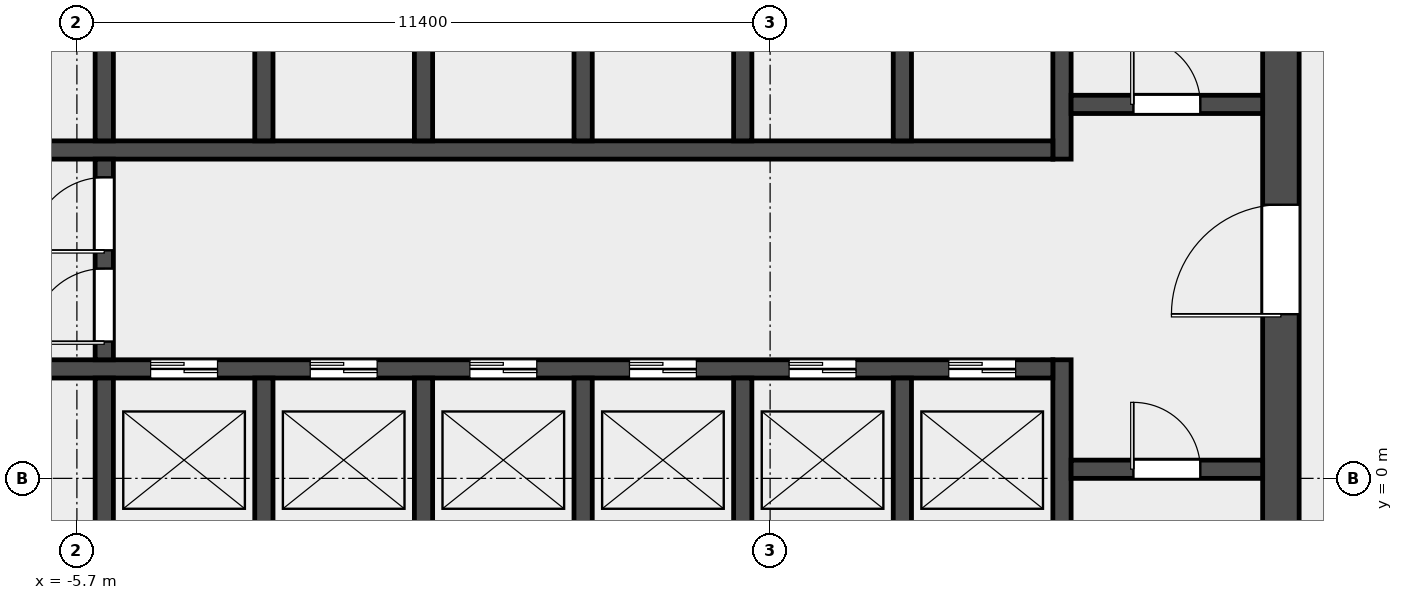
"""IFC4 building model, lengths in metres.
Left out: names, types, materials, properties, quantities, classifications, styles, units other than length and angle.
Written with IfcOpenShell. Run it as: python <this file> out.ifc"""

import sys

from ifc_helpers import new_model, si_unit, direction, frame, frame_2d, origin, place, context, subcontext, project, spatial, rectangle, extrude, element, fill, save


model = new_model("IFC4")
c1 = context("Model", 3, precision=1e-05, world=origin(), true_north=direction((0.0, 1.0)))
c2 = subcontext(c1, "Body", "Model", "MODEL_VIEW")
j1 = project(units=[si_unit("LENGTHUNIT", "METRE"), si_unit("PLANEANGLEUNIT", "RADIAN")], contexts=[c1])
p1 = place(None, origin())
s1 = spatial("IfcSite", under=j1, at=p1, CompositionType="ELEMENT")
p2 = place(p1, origin())
s2 = spatial("IfcBuilding", under=s1, at=p2, CompositionType="ELEMENT")
p3 = place(p2, frame((0.0, 0.0, 40.6)))
s3 = spatial("IfcBuildingStorey", under=s2, at=p3, CompositionType="ELEMENT", Elevation=40.6)
p4 = place(p3, frame((14.1, -6.6, 0.0), z_axis=(0.0, 0.0, 1.0), x_axis=(0.0, 1.0, 0.0)))
e1 = element("IfcWall", 1, at=p4, inside=s3, PredefinedType="SHEAR", context=c2, shape_type="SweptSolid", body=[
    extrude(rectangle(XDim=19.5, YDim=0.6, at=frame_2d((9.75, 0.0))), origin(), (0.0, 0.0, 1.0), 4.5),
])
p5 = place(p4, frame((9.3, 0.0, 0.0)))
e2 = element("IfcOpeningElement", 2, at=p5, cuts=e1, PredefinedType="OPENING", context=c2, shape_type="SweptSolid", body=[
    extrude(rectangle(XDim=1.8, YDim=2.1, at=frame_2d((0.9, 1.05))), frame((0.0, 0.312, 0.0), z_axis=(0.0, -1.0, 0.0), x_axis=(1.0, 0.0, 0.0)), (0.0, 0.0, 1.0), 0.624),
])
p6 = place(p3, frame((10.5, -6.6, 0.0), z_axis=(0.0, 0.0, 1.0), x_axis=(0.0, 1.0, 0.0)))
e3 = element("IfcWall", 3, at=p6, inside=s3, PredefinedType="SHEAR", context=c2, shape_type="SweptSolid", body=[
    extrude(rectangle(XDim=8.55, YDim=0.3, at=frame_2d((4.275, 0.0))), origin(), (0.0, 0.0, 1.0), 4.5),
])
p7 = place(p3, frame((10.5, 5.25, 0.0), z_axis=(0.0, 0.0, 1.0), x_axis=(0.0, 1.0, 0.0)))
e4 = element("IfcWall", 4, at=p7, inside=s3, PredefinedType="SHEAR", context=c2, shape_type="SweptSolid", body=[
    extrude(rectangle(XDim=7.65, YDim=0.3, at=frame_2d((3.825, 0.0))), origin(), (0.0, 0.0, 1.0), 4.5),
])
p8 = place(p3, frame((10.65, 0.15, 0.0), z_axis=(0.0, 0.0, 1.0), x_axis=(1.0, 0.0, 0.0)))
e5 = element("IfcWall", 5, at=p8, inside=s3, PredefinedType="SOLIDWALL", context=c2, shape_type="SweptSolid", body=[
    extrude(rectangle(XDim=3.15, YDim=0.3, at=frame_2d((1.575, 0.0))), origin(), (0.0, 0.0, 1.0), 4.5),
])
p9 = place(p8, frame((1.025, 0.0, 0.0)))
e6 = element("IfcOpeningElement", 6, at=p9, cuts=e5, PredefinedType="OPENING", context=c2, shape_type="SweptSolid", body=[
    extrude(rectangle(XDim=1.1, YDim=2.1, at=frame_2d((0.55, 1.05))), frame((0.0, 0.162, 0.0), z_axis=(0.0, -1.0, 0.0), x_axis=(1.0, 0.0, 0.0)), (0.0, 0.0, 1.0), 0.324),
])
p10 = place(p3, frame((10.65, 6.15, 0.0), z_axis=(0.0, 0.0, 1.0), x_axis=(1.0, 0.0, 0.0)))
e7 = element("IfcWall", 7, at=p10, inside=s3, PredefinedType="SOLIDWALL", context=c2, shape_type="SweptSolid", body=[
    extrude(rectangle(XDim=3.15, YDim=0.3, at=frame_2d((1.575, 0.0))), origin(), (0.0, 0.0, 1.0), 4.5),
])
p11 = place(p10, frame((1.025, 0.0, 0.0)))
e8 = element("IfcOpeningElement", 8, at=p11, cuts=e7, PredefinedType="OPENING", context=c2, shape_type="SweptSolid", body=[
    extrude(rectangle(XDim=1.1, YDim=2.1, at=frame_2d((0.55, 1.05))), frame((0.0, 0.162, 0.0), z_axis=(0.0, -1.0, 0.0), x_axis=(1.0, 0.0, 0.0)), (0.0, 0.0, 1.0), 0.324),
])
p12 = place(p3, frame((-10.35, 1.8, 0.0), z_axis=(0.0, 0.0, 1.0), x_axis=(1.0, 0.0, 0.0)))
e9 = element("IfcWall", 9, at=p12, inside=s3, PredefinedType="SOLIDWALL", context=c2, shape_type="SweptSolid", body=[
    extrude(rectangle(XDim=20.7, YDim=0.3, at=frame_2d((10.35, 0.0))), origin(), (0.0, 0.0, 1.0), 4.5),
])
p13 = place(p12, frame((0.512, 0.0, 0.0)))
e10 = element("IfcOpeningElement", 10, at=p13, cuts=e9, PredefinedType="OPENING", context=c2, shape_type="SweptSolid", body=[
    extrude(rectangle(XDim=1.3, YDim=2.1, at=frame_2d((0.65, 1.05))), frame((0.0, 0.162, 0.0), z_axis=(0.0, -1.0, 0.0), x_axis=(1.0, 0.0, 0.0)), (0.0, 0.0, 1.0), 0.324),
])
p14 = place(p12, frame((5.863, 0.0, 0.0)))
e11 = element("IfcOpeningElement", 11, at=p14, cuts=e9, PredefinedType="OPENING", context=c2, shape_type="SweptSolid", body=[
    extrude(rectangle(XDim=1.1, YDim=2.1, at=frame_2d((0.55, 1.05))), frame((0.0, 0.162, 0.0), z_axis=(0.0, -1.0, 0.0), x_axis=(1.0, 0.0, 0.0)), (0.0, 0.0, 1.0), 0.324),
])
p15 = place(p12, frame((8.488, 0.0, 0.0)))
e12 = element("IfcOpeningElement", 12, at=p15, cuts=e9, PredefinedType="OPENING", context=c2, shape_type="SweptSolid", body=[
    extrude(rectangle(XDim=1.1, YDim=2.1, at=frame_2d((0.55, 1.05))), frame((0.0, 0.162, 0.0), z_axis=(0.0, -1.0, 0.0), x_axis=(1.0, 0.0, 0.0)), (0.0, 0.0, 1.0), 0.324),
])
p16 = place(p12, frame((11.113, 0.0, 0.0)))
e13 = element("IfcOpeningElement", 13, at=p16, cuts=e9, PredefinedType="OPENING", context=c2, shape_type="SweptSolid", body=[
    extrude(rectangle(XDim=1.1, YDim=2.1, at=frame_2d((0.55, 1.05))), frame((0.0, 0.162, 0.0), z_axis=(0.0, -1.0, 0.0), x_axis=(1.0, 0.0, 0.0)), (0.0, 0.0, 1.0), 0.324),
])
p17 = place(p12, frame((13.738, 0.0, 0.0)))
e14 = element("IfcOpeningElement", 14, at=p17, cuts=e9, PredefinedType="OPENING", context=c2, shape_type="SweptSolid", body=[
    extrude(rectangle(XDim=1.1, YDim=2.1, at=frame_2d((0.55, 1.05))), frame((0.0, 0.162, 0.0), z_axis=(0.0, -1.0, 0.0), x_axis=(1.0, 0.0, 0.0)), (0.0, 0.0, 1.0), 0.324),
])
p18 = place(p12, frame((16.363, 0.0, 0.0)))
e15 = element("IfcOpeningElement", 15, at=p18, cuts=e9, PredefinedType="OPENING", context=c2, shape_type="SweptSolid", body=[
    extrude(rectangle(XDim=1.1, YDim=2.1, at=frame_2d((0.55, 1.05))), frame((0.0, 0.162, 0.0), z_axis=(0.0, -1.0, 0.0), x_axis=(1.0, 0.0, 0.0)), (0.0, 0.0, 1.0), 0.324),
])
p19 = place(p12, frame((18.988, 0.0, 0.0)))
e16 = element("IfcOpeningElement", 16, at=p19, cuts=e9, PredefinedType="OPENING", context=c2, shape_type="SweptSolid", body=[
    extrude(rectangle(XDim=1.1, YDim=2.1, at=frame_2d((0.55, 1.05))), frame((0.0, 0.162, 0.0), z_axis=(0.0, -1.0, 0.0), x_axis=(1.0, 0.0, 0.0)), (0.0, 0.0, 1.0), 0.324),
])
p20 = place(p3, frame((-10.35, 5.4, 0.0), z_axis=(0.0, 0.0, 1.0), x_axis=(1.0, 0.0, 0.0)))
e17 = element("IfcWall", 17, at=p20, inside=s3, PredefinedType="SOLIDWALL", context=c2, shape_type="SweptSolid", body=[
    extrude(rectangle(XDim=20.7, YDim=0.3, at=frame_2d((10.35, 0.0))), origin(), (0.0, 0.0, 1.0), 4.5),
])
p21 = place(p20, frame((0.512, 0.0, 0.0)))
e18 = element("IfcOpeningElement", 18, at=p21, cuts=e17, PredefinedType="OPENING", context=c2, shape_type="SweptSolid", body=[
    extrude(rectangle(XDim=1.3, YDim=2.1, at=frame_2d((0.65, 1.05))), frame((0.0, 0.162, 0.0), z_axis=(0.0, -1.0, 0.0), x_axis=(1.0, 0.0, 0.0)), (0.0, 0.0, 1.0), 0.324),
])
for number, where, z_axis, x_axis in (
    (19, (-5.25, -1.05, 0.0), (0.0, 0.0, 1.0), (0.0, 1.0, 0.0)),
    (20, (-2.625, -1.05, 0.0), (0.0, 0.0, 1.0), (0.0, 1.0, 0.0)),
    (21, (0.0, -1.05, 0.0), (0.0, 0.0, 1.0), (0.0, 1.0, 0.0)),
    (22, (2.625, -1.05, 0.0), (0.0, 0.0, 1.0), (0.0, 1.0, 0.0)),
    (23, (5.25, -1.05, 0.0), (0.0, 0.0, 1.0), (0.0, 1.0, 0.0)),
    (24, (7.875, -1.05, 0.0), (0.0, 0.0, 1.0), (0.0, 1.0, 0.0)),
    (25, (-5.25, 5.55, 0.0), (0.0, 0.0, 1.0), (0.0, 1.0, 0.0)),
    (26, (-2.625, 5.55, 0.0), (0.0, 0.0, 1.0), (0.0, 1.0, 0.0)),
    (27, (0.0, 5.55, 0.0), (0.0, 0.0, 1.0), (0.0, 1.0, 0.0)),
    (28, (2.625, 5.55, 0.0), (0.0, 0.0, 1.0), (0.0, 1.0, 0.0)),
    (29, (5.25, 5.55, 0.0), (0.0, 0.0, 1.0), (0.0, 1.0, 0.0)),
    (30, (7.875, 5.55, 0.0), (0.0, 0.0, 1.0), (0.0, 1.0, 0.0)),
):
    element("IfcWall", number, at=place(p3, frame(where, z_axis=z_axis, x_axis=x_axis)), inside=s3, PredefinedType="SOLIDWALL", context=c2, shape_type="SweptSolid", body=[
        extrude(rectangle(XDim=2.7, YDim=0.3, at=frame_2d((1.35, 0.0))), origin(), (0.0, 0.0, 1.0), 4.5),
    ])
p22 = place(p3, frame((-5.25, 1.95, 0.0), z_axis=(0.0, 0.0, 1.0), x_axis=(0.0, 1.0, 0.0)))
e31 = element("IfcWall", 31, at=p22, inside=s3, PredefinedType="SOLIDWALL", context=c2, shape_type="SweptSolid", body=[
    extrude(rectangle(XDim=3.3, YDim=0.3, at=frame_2d((1.65, 0.0))), origin(), (0.0, 0.0, 1.0), 4.5),
])
p23 = place(p22, frame((0.3, 0.0, 0.0)))
e32 = element("IfcOpeningElement", 32, at=p23, cuts=e31, PredefinedType="OPENING", context=c2, shape_type="SweptSolid", body=[
    extrude(rectangle(XDim=1.2, YDim=2.1, at=frame_2d((0.6, 1.05))), frame((0.0, 0.162, 0.0), z_axis=(0.0, -1.0, 0.0), x_axis=(1.0, 0.0, 0.0)), (0.0, 0.0, 1.0), 0.324),
])
p24 = place(p22, frame((1.8, 0.0, 0.0)))
e33 = element("IfcOpeningElement", 33, at=p24, cuts=e31, PredefinedType="OPENING", context=c2, shape_type="SweptSolid", body=[
    extrude(rectangle(XDim=1.2, YDim=2.1, at=frame_2d((0.6, 1.05))), frame((0.0, 0.162, 0.0), z_axis=(0.0, -1.0, 0.0), x_axis=(1.0, 0.0, 0.0)), (0.0, 0.0, 1.0), 0.324),
])
p25 = place(p9, origin())
e34 = element("IfcDoor", 34, at=p25, inside=s3, OperationType="SINGLE_SWING_RIGHT", PredefinedType="DOOR", context=c2, shape_type="SweptSolid", body=[
    extrude(rectangle(XDim=1.1, YDim=2.1, at=frame_2d((0.55, 1.05))), frame((0.0, 0.025, 0.0), z_axis=(0.0, -1.0, 0.0), x_axis=(1.0, 0.0, 0.0)), (0.0, 0.0, 1.0), 0.05),
])
fill(e6, e34)
p26 = place(p11, origin())
e35 = element("IfcDoor", 35, at=p26, inside=s3, OperationType="SINGLE_SWING_RIGHT", PredefinedType="DOOR", context=c2, shape_type="SweptSolid", body=[
    extrude(rectangle(XDim=1.1, YDim=2.1, at=frame_2d((0.55, 1.05))), frame((0.0, 0.025, 0.0), z_axis=(0.0, -1.0, 0.0), x_axis=(1.0, 0.0, 0.0)), (0.0, 0.0, 1.0), 0.05),
])
fill(e8, e35)
p27 = place(p5, origin())
e36 = element("IfcDoor", 36, at=p27, inside=s3, OperationType="DOUBLE_DOOR_SINGLE_SWING", PredefinedType="DOOR", context=c2, shape_type="SweptSolid", body=[
    extrude(rectangle(XDim=1.8, YDim=2.1, at=frame_2d((0.9, 1.05))), frame((0.0, 0.025, 0.0), z_axis=(0.0, -1.0, 0.0), x_axis=(1.0, 0.0, 0.0)), (0.0, 0.0, 1.0), 0.05),
])
fill(e2, e36)
p28 = place(p23, origin())
e37 = element("IfcDoor", 37, at=p28, inside=s3, OperationType="SINGLE_SWING_LEFT", PredefinedType="DOOR", context=c2, shape_type="SweptSolid", body=[
    extrude(rectangle(XDim=1.2, YDim=2.1, at=frame_2d((0.6, 1.05))), frame((0.0, 0.025, 0.0), z_axis=(0.0, -1.0, 0.0), x_axis=(1.0, 0.0, 0.0)), (0.0, 0.0, 1.0), 0.05),
])
fill(e32, e37)
p29 = place(p24, origin())
e38 = element("IfcDoor", 38, at=p29, inside=s3, OperationType="SINGLE_SWING_RIGHT", PredefinedType="DOOR", context=c2, shape_type="SweptSolid", body=[
    extrude(rectangle(XDim=1.2, YDim=2.1, at=frame_2d((0.6, 1.05))), frame((0.0, 0.025, 0.0), z_axis=(0.0, -1.0, 0.0), x_axis=(1.0, 0.0, 0.0)), (0.0, 0.0, 1.0), 0.05),
])
fill(e33, e38)
p30 = place(p14, origin())
e39 = element("IfcDoor", 39, at=p30, inside=s3, OperationType="DOUBLE_DOOR_SLIDING", PredefinedType="DOOR", context=c2, shape_type="SweptSolid", body=[
    extrude(rectangle(XDim=1.1, YDim=2.1, at=frame_2d((0.55, 1.05))), frame((0.0, 0.025, 0.0), z_axis=(0.0, -1.0, 0.0), x_axis=(1.0, 0.0, 0.0)), (0.0, 0.0, 1.0), 0.05),
])
fill(e11, e39)
p31 = place(p15, origin())
e40 = element("IfcDoor", 40, at=p31, inside=s3, OperationType="DOUBLE_DOOR_SLIDING", PredefinedType="DOOR", context=c2, shape_type="SweptSolid", body=[
    extrude(rectangle(XDim=1.1, YDim=2.1, at=frame_2d((0.55, 1.05))), frame((0.0, 0.025, 0.0), z_axis=(0.0, -1.0, 0.0), x_axis=(1.0, 0.0, 0.0)), (0.0, 0.0, 1.0), 0.05),
])
fill(e12, e40)
p32 = place(p16, origin())
e41 = element("IfcDoor", 41, at=p32, inside=s3, OperationType="DOUBLE_DOOR_SLIDING", PredefinedType="DOOR", context=c2, shape_type="SweptSolid", body=[
    extrude(rectangle(XDim=1.1, YDim=2.1, at=frame_2d((0.55, 1.05))), frame((0.0, 0.025, 0.0), z_axis=(0.0, -1.0, 0.0), x_axis=(1.0, 0.0, 0.0)), (0.0, 0.0, 1.0), 0.05),
])
fill(e13, e41)
p33 = place(p17, origin())
e42 = element("IfcDoor", 42, at=p33, inside=s3, OperationType="DOUBLE_DOOR_SLIDING", PredefinedType="DOOR", context=c2, shape_type="SweptSolid", body=[
    extrude(rectangle(XDim=1.1, YDim=2.1, at=frame_2d((0.55, 1.05))), frame((0.0, 0.025, 0.0), z_axis=(0.0, -1.0, 0.0), x_axis=(1.0, 0.0, 0.0)), (0.0, 0.0, 1.0), 0.05),
])
fill(e14, e42)
p34 = place(p18, origin())
e43 = element("IfcDoor", 43, at=p34, inside=s3, OperationType="DOUBLE_DOOR_SLIDING", PredefinedType="DOOR", context=c2, shape_type="SweptSolid", body=[
    extrude(rectangle(XDim=1.1, YDim=2.1, at=frame_2d((0.55, 1.05))), frame((0.0, 0.025, 0.0), z_axis=(0.0, -1.0, 0.0), x_axis=(1.0, 0.0, 0.0)), (0.0, 0.0, 1.0), 0.05),
])
fill(e15, e43)
p35 = place(p19, origin())
e44 = element("IfcDoor", 44, at=p35, inside=s3, OperationType="DOUBLE_DOOR_SLIDING", PredefinedType="DOOR", context=c2, shape_type="SweptSolid", body=[
    extrude(rectangle(XDim=1.1, YDim=2.1, at=frame_2d((0.55, 1.05))), frame((0.0, 0.025, 0.0), z_axis=(0.0, -1.0, 0.0), x_axis=(1.0, 0.0, 0.0)), (0.0, 0.0, 1.0), 0.05),
])
fill(e16, e44)
save(model, sys.argv[1])
